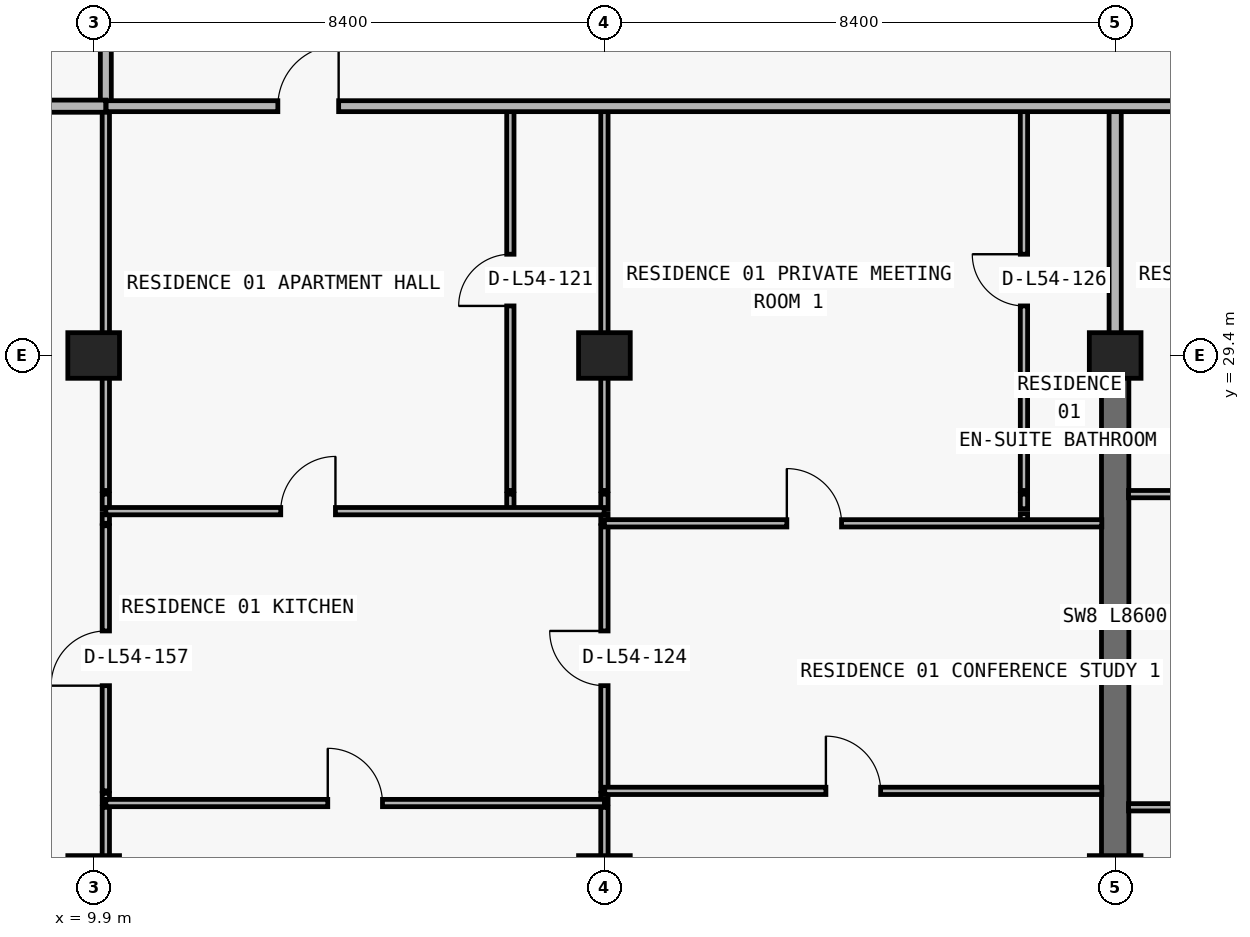
"""IFC4 building model, lengths in metres.
Left out: names, types, materials, properties, quantities, classifications, styles, units other than length and angle.
Written with IfcOpenShell. Run it as: python <this file> out.ifc"""

import sys

from ifc_helpers import new_model, si_unit, direction, frame, frame_2d, origin, origin_2d, place, context, subcontext, project, spatial, rectangle, extrude, element, fill, save


model = new_model("IFC4")
c1 = context("Model", 3, precision=1e-05, world=origin(), true_north=direction((0.0, 1.0)))
c2 = subcontext(c1, "Body", "Model", "MODEL_VIEW")
j1 = project(units=[si_unit("LENGTHUNIT", "METRE"), si_unit("PLANEANGLEUNIT", "RADIAN")], contexts=[c1])
p1 = place(None, origin())
s1 = spatial("IfcSite", under=j1, at=p1, CompositionType="ELEMENT")
p2 = place(p1, origin())
s2 = spatial("IfcBuilding", under=s1, at=p2, CompositionType="ELEMENT")
p3 = place(p2, frame((0.0, 0.0, 195.0)))
s3 = spatial("IfcBuildingStorey", under=s2, at=p3, CompositionType="ELEMENT", Elevation=195.0)
for number, where, z_axis, x_axis in (
    (1, (9.9, 20.8, 0.0), (0.0, 0.0, 1.0), (1.0, 0.0, 0.0)),
    (2, (18.3, 20.8, 0.0), (0.0, 0.0, 1.0), (1.0, 0.0, 0.0)),
    (3, (26.7, 20.8, 0.0), (0.0, 0.0, 1.0), (1.0, 0.0, 0.0)),
    (4, (9.9, 29.4, 0.0), (0.0, 0.0, 1.0), (1.0, 0.0, 0.0)),
    (5, (18.3, 29.4, 0.0), (0.0, 0.0, 1.0), (1.0, 0.0, 0.0)),
    (6, (26.7, 29.4, 0.0), (0.0, 0.0, 1.0), (1.0, 0.0, 0.0)),
):
    element("IfcColumn", number, at=place(p3, frame(where, z_axis=z_axis, x_axis=x_axis)), inside=s3, PredefinedType="COLUMN", context=c2, shape_type="SweptSolid", body=[
        extrude(rectangle(XDim=0.85, YDim=0.75, at=origin_2d()), origin(), (0.0, 0.0, 1.0), 3.05),
    ])
p4 = place(p3, frame((26.7, 20.8, 0.0), z_axis=(0.0, 0.0, 1.0), x_axis=(0.0, 1.0, 0.0)))
e7 = element("IfcWall", 7, at=p4, inside=s3, PredefinedType="SHEAR", context=c2, shape_type="SweptSolid", body=[
    extrude(rectangle(XDim=8.6, YDim=0.45, at=frame_2d((4.3, 0.0))), origin(), (0.0, 0.0, 1.0), 3.05),
])
p5 = place(p3, frame((10.1, 11.285, 0.0), z_axis=(0.0, 0.0, 1.0), x_axis=(0.0, 1.0, 0.0)))
e8 = element("IfcWall", 8, at=p5, inside=s3, PredefinedType="PARTITIONING", context=c2, shape_type="SweptSolid", body=[
    extrude(rectangle(XDim=10.685, YDim=0.12, at=frame_2d((5.343, 0.0))), origin(), (0.0, 0.0, 1.0), 2.263),
])
p6 = place(p3, frame((10.1, 22.04, 0.0), z_axis=(0.0, 0.0, 1.0), x_axis=(0.0, 1.0, 0.0)))
e9 = element("IfcWall", 9, at=p6, inside=s3, PredefinedType="PARTITIONING", context=c2, shape_type="SweptSolid", body=[
    extrude(rectangle(XDim=0.16, YDim=0.12, at=frame_2d((0.08, 0.0))), origin(), (0.0, 0.0, 1.0), 2.263),
])
p7 = place(p3, frame((10.1, 22.24, 0.0), z_axis=(0.0, 0.0, 1.0), x_axis=(0.0, 1.0, 0.0)))
e10 = element("IfcWall", 10, at=p7, inside=s3, PredefinedType="PARTITIONING", context=c2, shape_type="SweptSolid", body=[
    extrude(rectangle(XDim=4.36, YDim=0.12, at=frame_2d((2.18, 0.0))), origin(), (0.0, 0.0, 1.0), 2.263),
])
p8 = place(p7, frame((1.73, 0.0, 0.0)))
e11 = element("IfcOpeningElement", 11, at=p8, cuts=e10, PredefinedType="OPENING", context=c2, shape_type="SweptSolid", body=[
    extrude(rectangle(XDim=0.9, YDim=2.15, at=frame_2d((0.45, 1.075))), frame((0.0, 0.07, 0.0), z_axis=(0.0, -1.0, 0.0), x_axis=(1.0, 0.0, 0.0)), (0.0, 0.0, 1.0), 0.14),
])
p9 = place(p3, frame((10.1, 26.64, 0.0), z_axis=(0.0, 0.0, 1.0), x_axis=(0.0, 1.0, 0.0)))
e12 = element("IfcWall", 12, at=p9, inside=s3, PredefinedType="PARTITIONING", context=c2, shape_type="SweptSolid", body=[
    extrude(rectangle(XDim=0.16, YDim=0.12, at=frame_2d((0.08, 0.0))), origin(), (0.0, 0.0, 1.0), 2.263),
])
p10 = place(p3, frame((10.1, 26.88, 0.0), z_axis=(0.0, 0.0, 1.0), x_axis=(0.0, 1.0, 0.0)))
e13 = element("IfcWall", 13, at=p10, inside=s3, PredefinedType="PARTITIONING", context=c2, shape_type="SweptSolid", body=[
    extrude(rectangle(XDim=0.24, YDim=0.12, at=frame_2d((0.12, 0.0))), origin(), (0.0, 0.0, 1.0), 2.263),
])
p11 = place(p3, frame((10.1, 27.18, 0.0), z_axis=(0.0, 0.0, 1.0), x_axis=(0.0, 1.0, 0.0)))
e14 = element("IfcWall", 14, at=p11, inside=s3, PredefinedType="PARTITIONING", context=c2, shape_type="SweptSolid", body=[
    extrude(rectangle(XDim=6.32, YDim=0.12, at=frame_2d((3.16, 0.0))), origin(), (0.0, 0.0, 1.0), 2.263),
])
p12 = place(p3, frame((10.1, 33.505, 0.0), z_axis=(0.0, 0.0, 1.0), x_axis=(0.0, 1.0, 0.0)))
e15 = element("IfcWall", 15, at=p12, inside=s3, PredefinedType="PARTITIONING", context=c2, shape_type="SweptSolid", body=[
    extrude(rectangle(XDim=3.495, YDim=0.18, at=frame_2d((1.748, 0.0))), origin(), (0.0, 0.0, 1.0), 2.263),
])
p13 = place(p3, frame((16.753, 26.88, 0.0), z_axis=(0.0, 0.0, 1.0), x_axis=(0.0, 1.0, 0.0)))
e16 = element("IfcWall", 16, at=p13, inside=s3, PredefinedType="PARTITIONING", context=c2, shape_type="SweptSolid", body=[
    extrude(rectangle(XDim=0.24, YDim=0.12, at=frame_2d((0.12, 0.0))), origin(), (0.0, 0.0, 1.0), 3.05),
])
p14 = place(p3, frame((16.753, 27.18, 0.0), z_axis=(0.0, 0.0, 1.0), x_axis=(0.0, 1.0, 0.0)))
e17 = element("IfcWall", 17, at=p14, inside=s3, PredefinedType="PARTITIONING", context=c2, shape_type="SweptSolid", body=[
    extrude(rectangle(XDim=6.32, YDim=0.12, at=frame_2d((3.16, 0.0))), origin(), (0.0, 0.0, 1.0), 3.05),
])
p15 = place(p14, frame((3.035, 0.0, 0.0)))
e18 = element("IfcOpeningElement", 18, at=p15, cuts=e17, PredefinedType="OPENING", context=c2, shape_type="SweptSolid", body=[
    extrude(rectangle(XDim=0.85, YDim=2.1, at=frame_2d((0.425, 1.05))), frame((0.0, 0.07, 0.0), z_axis=(0.0, -1.0, 0.0), x_axis=(1.0, 0.0, 0.0)), (0.0, 0.0, 1.0), 0.14),
])
p16 = place(p3, frame((18.3, 11.24, 0.0), z_axis=(0.0, 0.0, 1.0), x_axis=(0.0, 1.0, 0.0)))
e19 = element("IfcWall", 19, at=p16, inside=s3, PredefinedType="PARTITIONING", context=c2, shape_type="SweptSolid", body=[
    extrude(rectangle(XDim=10.73, YDim=0.12, at=frame_2d((5.365, 0.0))), origin(), (0.0, 0.0, 1.0), 2.263),
])
p17 = place(p3, frame((18.3, 22.04, 0.0), z_axis=(0.0, 0.0, 1.0), x_axis=(0.0, 1.0, 0.0)))
e20 = element("IfcWall", 20, at=p17, inside=s3, PredefinedType="PARTITIONING", context=c2, shape_type="SweptSolid", body=[
    extrude(rectangle(XDim=0.16, YDim=0.12, at=frame_2d((0.08, 0.0))), origin(), (0.0, 0.0, 1.0), 2.263),
])
p18 = place(p3, frame((18.3, 22.24, 0.0), z_axis=(0.0, 0.0, 1.0), x_axis=(0.0, 1.0, 0.0)))
e21 = element("IfcWall", 21, at=p18, inside=s3, PredefinedType="PARTITIONING", context=c2, shape_type="SweptSolid", body=[
    extrude(rectangle(XDim=4.36, YDim=0.12, at=frame_2d((2.18, 0.0))), origin(), (0.0, 0.0, 1.0), 2.263),
])
p19 = place(p18, frame((1.73, 0.0, 0.0)))
e22 = element("IfcOpeningElement", 22, at=p19, cuts=e21, PredefinedType="OPENING", context=c2, shape_type="SweptSolid", body=[
    extrude(rectangle(XDim=0.9, YDim=2.15, at=frame_2d((0.45, 1.075))), frame((0.0, 0.07, 0.0), z_axis=(0.0, -1.0, 0.0), x_axis=(1.0, 0.0, 0.0)), (0.0, 0.0, 1.0), 0.14),
])
p20 = place(p3, frame((18.3, 26.64, 0.0), z_axis=(0.0, 0.0, 1.0), x_axis=(0.0, 1.0, 0.0)))
e23 = element("IfcWall", 23, at=p20, inside=s3, PredefinedType="PARTITIONING", context=c2, shape_type="SweptSolid", body=[
    extrude(rectangle(XDim=0.16, YDim=0.12, at=frame_2d((0.08, 0.0))), origin(), (0.0, 0.0, 1.0), 2.263),
])
p21 = place(p3, frame((18.3, 26.88, 0.0), z_axis=(0.0, 0.0, 1.0), x_axis=(0.0, 1.0, 0.0)))
e24 = element("IfcWall", 24, at=p21, inside=s3, PredefinedType="PARTITIONING", context=c2, shape_type="SweptSolid", body=[
    extrude(rectangle(XDim=0.24, YDim=0.12, at=frame_2d((0.12, 0.0))), origin(), (0.0, 0.0, 1.0), 2.263),
])
p22 = place(p3, frame((18.3, 27.18, 0.0), z_axis=(0.0, 0.0, 1.0), x_axis=(0.0, 1.0, 0.0)))
e25 = element("IfcWall", 25, at=p22, inside=s3, PredefinedType="PARTITIONING", context=c2, shape_type="SweptSolid", body=[
    extrude(rectangle(XDim=6.32, YDim=0.12, at=frame_2d((3.16, 0.0))), origin(), (0.0, 0.0, 1.0), 2.263),
])
p23 = place(p3, frame((25.2, 26.64, 0.0), z_axis=(0.0, 0.0, 1.0), x_axis=(0.0, 1.0, 0.0)))
e26 = element("IfcWall", 26, at=p23, inside=s3, PredefinedType="PARTITIONING", context=c2, shape_type="SweptSolid", body=[
    extrude(rectangle(XDim=0.16, YDim=0.12, at=frame_2d((0.08, 0.0))), origin(), (0.0, 0.0, 1.0), 3.05),
])
p24 = place(p3, frame((25.2, 26.88, 0.0), z_axis=(0.0, 0.0, 1.0), x_axis=(0.0, 1.0, 0.0)))
e27 = element("IfcWall", 27, at=p24, inside=s3, PredefinedType="PARTITIONING", context=c2, shape_type="SweptSolid", body=[
    extrude(rectangle(XDim=0.24, YDim=0.12, at=frame_2d((0.12, 0.0))), origin(), (0.0, 0.0, 1.0), 3.05),
])
p25 = place(p3, frame((25.2, 27.18, 0.0), z_axis=(0.0, 0.0, 1.0), x_axis=(0.0, 1.0, 0.0)))
e28 = element("IfcWall", 28, at=p25, inside=s3, PredefinedType="PARTITIONING", context=c2, shape_type="SweptSolid", body=[
    extrude(rectangle(XDim=6.32, YDim=0.12, at=frame_2d((3.16, 0.0))), origin(), (0.0, 0.0, 1.0), 3.05),
])
p26 = place(p25, frame((3.035, 0.0, 0.0)))
e29 = element("IfcOpeningElement", 29, at=p26, cuts=e28, PredefinedType="OPENING", context=c2, shape_type="SweptSolid", body=[
    extrude(rectangle(XDim=0.85, YDim=2.1, at=frame_2d((0.425, 1.05))), frame((0.0, 0.07, 0.0), z_axis=(0.0, -1.0, 0.0), x_axis=(1.0, 0.0, 0.0)), (0.0, 0.0, 1.0), 0.14),
])
p27 = place(p3, frame((26.7, 29.405, 0.0), z_axis=(0.0, 0.0, 1.0), x_axis=(0.0, 1.0, 0.0)))
e30 = element("IfcWall", 30, at=p27, inside=s3, PredefinedType="PARTITIONING", context=c2, shape_type="SweptSolid", body=[
    extrude(rectangle(XDim=4.095, YDim=0.2, at=frame_2d((2.047, 0.0))), origin(), (0.0, 0.0, 1.0), 2.335),
])
p28 = place(p3, frame((26.92, 21.97, 0.0), z_axis=(0.0, 0.0, 1.0), x_axis=(1.0, 0.0, 0.0)))
e31 = element("IfcWall", 31, at=p28, inside=s3, PredefinedType="PARTITIONING", context=c2, shape_type="SweptSolid", body=[
    extrude(rectangle(XDim=8.18, YDim=0.12, at=frame_2d((4.09, 0.0))), origin(), (0.0, 0.0, 1.0), 3.05),
])
p29 = place(p28, frame((1.75, 0.0, 0.0)))
e32 = element("IfcOpeningElement", 32, at=p29, cuts=e31, PredefinedType="OPENING", context=c2, shape_type="SweptSolid", body=[
    extrude(rectangle(XDim=0.9, YDim=2.15, at=frame_2d((0.45, 1.075))), frame((0.0, 0.07, 0.0), z_axis=(0.0, -1.0, 0.0), x_axis=(1.0, 0.0, 0.0)), (0.0, 0.0, 1.0), 0.14),
])
p30 = place(p28, frame((5.923, 0.0, 0.0)))
e33 = element("IfcOpeningElement", 33, at=p30, cuts=e31, PredefinedType="OPENING", context=c2, shape_type="SweptSolid", body=[
    extrude(rectangle(XDim=0.9, YDim=2.15, at=frame_2d((0.45, 1.075))), frame((0.0, 0.07, 0.0), z_axis=(0.0, -1.0, 0.0), x_axis=(1.0, 0.0, 0.0)), (0.0, 0.0, 1.0), 0.14),
])
p31 = place(p3, frame((10.1, 22.04, 0.0), z_axis=(0.0, 0.0, 1.0), x_axis=(1.0, 0.0, 0.0)))
e34 = element("IfcWall", 34, at=p31, inside=s3, PredefinedType="PARTITIONING", context=c2, shape_type="SweptSolid", body=[
    extrude(rectangle(XDim=8.2, YDim=0.12, at=frame_2d((4.1, 0.0))), origin(), (0.0, 0.0, 1.0), 3.05),
])
p32 = place(p31, frame((3.65, 0.0, 0.0)))
e35 = element("IfcOpeningElement", 35, at=p32, cuts=e34, PredefinedType="OPENING", context=c2, shape_type="SweptSolid", body=[
    extrude(rectangle(XDim=0.9, YDim=2.15, at=frame_2d((0.45, 1.075))), frame((0.0, 0.07, 0.0), z_axis=(0.0, -1.0, 0.0), x_axis=(1.0, 0.0, 0.0)), (0.0, 0.0, 1.0), 0.14),
])
p33 = place(p3, frame((18.305, 22.24, 0.0), z_axis=(0.0, 0.0, 1.0), x_axis=(1.0, 0.0, 0.0)))
e36 = element("IfcWall", 36, at=p33, inside=s3, PredefinedType="PARTITIONING", context=c2, shape_type="SweptSolid", body=[
    extrude(rectangle(XDim=8.175, YDim=0.12, at=frame_2d((4.087, 0.0))), origin(), (0.0, 0.0, 1.0), 3.05),
])
p34 = place(p33, frame((3.637, 0.0, 0.0)))
e37 = element("IfcOpeningElement", 37, at=p34, cuts=e36, PredefinedType="OPENING", context=c2, shape_type="SweptSolid", body=[
    extrude(rectangle(XDim=0.9, YDim=2.15, at=frame_2d((0.45, 1.075))), frame((0.0, 0.07, 0.0), z_axis=(0.0, -1.0, 0.0), x_axis=(1.0, 0.0, 0.0)), (0.0, 0.0, 1.0), 0.14),
])
p35 = place(p3, frame((18.3, 26.64, 0.0), z_axis=(0.0, 0.0, 1.0), x_axis=(1.0, 0.0, 0.0)))
e38 = element("IfcWall", 38, at=p35, inside=s3, PredefinedType="PARTITIONING", context=c2, shape_type="SweptSolid", body=[
    extrude(rectangle(XDim=8.18, YDim=0.12, at=frame_2d((4.09, 0.0))), origin(), (0.0, 0.0, 1.0), 3.05),
])
p36 = place(p35, frame((3.0, 0.0, 0.0)))
e39 = element("IfcOpeningElement", 39, at=p36, cuts=e38, PredefinedType="OPENING", context=c2, shape_type="SweptSolid", body=[
    extrude(rectangle(XDim=0.9, YDim=2.15, at=frame_2d((0.45, 1.075))), frame((0.0, 0.07, 0.0), z_axis=(0.0, -1.0, 0.0), x_axis=(1.0, 0.0, 0.0)), (0.0, 0.0, 1.0), 0.14),
])
p37 = place(p3, frame((10.1, 26.84, 0.0), z_axis=(0.0, 0.0, 1.0), x_axis=(1.0, 0.0, 0.0)))
e40 = element("IfcWall", 40, at=p37, inside=s3, PredefinedType="PARTITIONING", context=c2, shape_type="SweptSolid", body=[
    extrude(rectangle(XDim=8.195, YDim=0.12, at=frame_2d((4.097, 0.0))), origin(), (0.0, 0.0, 1.0), 3.05),
])
p38 = place(p37, frame((2.876, 0.0, 0.0)))
e41 = element("IfcOpeningElement", 41, at=p38, cuts=e40, PredefinedType="OPENING", context=c2, shape_type="SweptSolid", body=[
    extrude(rectangle(XDim=0.9, YDim=2.15, at=frame_2d((0.45, 1.075))), frame((0.0, 0.07, 0.0), z_axis=(0.0, -1.0, 0.0), x_axis=(1.0, 0.0, 0.0)), (0.0, 0.0, 1.0), 0.14),
])
p39 = place(p3, frame((26.92, 27.12, 0.0), z_axis=(0.0, 0.0, 1.0), x_axis=(1.0, 0.0, 0.0)))
e42 = element("IfcWall", 42, at=p39, inside=s3, PredefinedType="PARTITIONING", context=c2, shape_type="SweptSolid", body=[
    extrude(rectangle(XDim=8.18, YDim=0.12, at=frame_2d((4.09, 0.0))), origin(), (0.0, 0.0, 1.0), 3.05),
])
p40 = place(p39, frame((1.833, 0.0, 0.0)))
e43 = element("IfcOpeningElement", 43, at=p40, cuts=e42, PredefinedType="OPENING", context=c2, shape_type="SweptSolid", body=[
    extrude(rectangle(XDim=0.9, YDim=2.15, at=frame_2d((0.45, 1.075))), frame((0.0, 0.07, 0.0), z_axis=(0.0, -1.0, 0.0), x_axis=(1.0, 0.0, 0.0)), (0.0, 0.0, 1.0), 0.14),
])
p41 = place(p3, frame((6.395, 33.5, 0.0), z_axis=(0.0, 0.0, 1.0), x_axis=(1.0, 0.0, 0.0)))
e44 = element("IfcWall", 44, at=p41, inside=s3, PredefinedType="PARTITIONING", context=c2, shape_type="SweptSolid", body=[
    extrude(rectangle(XDim=3.705, YDim=0.2, at=frame_2d((1.853, 0.0))), origin(), (0.0, 0.0, 1.0), 3.05),
])
p42 = place(p3, frame((10.105, 33.5, 0.0), z_axis=(0.0, 0.0, 1.0), x_axis=(1.0, 0.0, 0.0)))
e45 = element("IfcWall", 45, at=p42, inside=s3, PredefinedType="PARTITIONING", context=c2, shape_type="SweptSolid", body=[
    extrude(rectangle(XDim=57.595, YDim=0.18, at=frame_2d((28.797, 0.0))), origin(), (0.0, 0.0, 1.0), 3.05),
])
p43 = place(p42, frame((2.824, 0.0, 0.0)))
e46 = element("IfcOpeningElement", 46, at=p43, cuts=e45, PredefinedType="OPENING", context=c2, shape_type="SweptSolid", body=[
    extrude(rectangle(XDim=1.0, YDim=2.2, at=frame_2d((0.5, 1.1))), frame((0.0, 0.1, 0.0), z_axis=(0.0, -1.0, 0.0), x_axis=(1.0, 0.0, 0.0)), (0.0, 0.0, 1.0), 0.2),
])
p44 = place(p42, frame((19.47, 0.0, 0.0)))
e47 = element("IfcOpeningElement", 47, at=p44, cuts=e45, PredefinedType="OPENING", context=c2, shape_type="SweptSolid", body=[
    extrude(rectangle(XDim=1.0, YDim=2.2, at=frame_2d((0.5, 1.1))), frame((0.0, 0.1, 0.0), z_axis=(0.0, -1.0, 0.0), x_axis=(1.0, 0.0, 0.0)), (0.0, 0.0, 1.0), 0.2),
])
p45 = place(p42, frame((27.527, 0.0, 0.0)))
e48 = element("IfcOpeningElement", 48, at=p45, cuts=e45, PredefinedType="OPENING", context=c2, shape_type="SweptSolid", body=[
    extrude(rectangle(XDim=1.0, YDim=2.2, at=frame_2d((0.5, 1.1))), frame((0.0, 0.1, 0.0), z_axis=(0.0, -1.0, 0.0), x_axis=(1.0, 0.0, 0.0)), (0.0, 0.0, 1.0), 0.2),
])
p46 = place(p42, frame((43.87, 0.0, 0.0)))
e49 = element("IfcOpeningElement", 49, at=p46, cuts=e45, PredefinedType="OPENING", context=c2, shape_type="SweptSolid", body=[
    extrude(rectangle(XDim=1.0, YDim=2.2, at=frame_2d((0.5, 1.1))), frame((0.0, 0.1, 0.0), z_axis=(0.0, -1.0, 0.0), x_axis=(1.0, 0.0, 0.0)), (0.0, 0.0, 1.0), 0.2),
])
p47 = place(p42, frame((52.17, 0.0, 0.0)))
e50 = element("IfcOpeningElement", 50, at=p47, cuts=e45, PredefinedType="OPENING", context=c2, shape_type="SweptSolid", body=[
    extrude(rectangle(XDim=1.0, YDim=2.2, at=frame_2d((0.5, 1.1))), frame((0.0, 0.1, 0.0), z_axis=(0.0, -1.0, 0.0), x_axis=(1.0, 0.0, 0.0)), (0.0, 0.0, 1.0), 0.2),
])
p48 = place(p43, origin())
e51 = element("IfcDoor", 51, at=p48, inside=s3, OperationType="SINGLE_SWING_RIGHT", PredefinedType="DOOR", context=c2, shape_type="SweptSolid", body=[
    extrude(rectangle(XDim=1.0, YDim=2.2, at=frame_2d((0.5, 1.1))), frame((0.0, 0.025, 0.0), z_axis=(0.0, -1.0, 0.0), x_axis=(1.0, 0.0, 0.0)), (0.0, 0.0, 1.0), 0.05),
])
fill(e46, e51)
p49 = place(p15, origin())
e52 = element("IfcDoor", 52, at=p49, inside=s3, OperationType="SINGLE_SWING_LEFT", PredefinedType="DOOR", context=c2, shape_type="SweptSolid", body=[
    extrude(rectangle(XDim=0.85, YDim=2.1, at=frame_2d((0.425, 1.05))), frame((0.0, 0.025, 0.0), z_axis=(0.0, -1.0, 0.0), x_axis=(1.0, 0.0, 0.0)), (0.0, 0.0, 1.0), 0.05),
])
fill(e18, e52)
p50 = place(p38, origin())
e53 = element("IfcDoor", 53, at=p50, inside=s3, OperationType="SINGLE_SWING_RIGHT", PredefinedType="DOOR", context=c2, shape_type="SweptSolid", body=[
    extrude(rectangle(XDim=0.9, YDim=2.15, at=frame_2d((0.45, 1.075))), frame((0.0, 0.025, 0.0), z_axis=(0.0, -1.0, 0.0), x_axis=(1.0, 0.0, 0.0)), (0.0, 0.0, 1.0), 0.05),
])
fill(e41, e53)
p51 = place(p32, origin())
e54 = element("IfcDoor", 54, at=p51, inside=s3, OperationType="SINGLE_SWING_LEFT", PredefinedType="DOOR", context=c2, shape_type="SweptSolid", body=[
    extrude(rectangle(XDim=0.9, YDim=2.15, at=frame_2d((0.45, 1.075))), frame((0.0, 0.025, 0.0), z_axis=(0.0, -1.0, 0.0), x_axis=(1.0, 0.0, 0.0)), (0.0, 0.0, 1.0), 0.05),
])
fill(e35, e54)
p52 = place(p19, origin())
e55 = element("IfcDoor", 55, at=p52, inside=s3, OperationType="SINGLE_SWING_RIGHT", PredefinedType="DOOR", context=c2, shape_type="SweptSolid", body=[
    extrude(rectangle(XDim=0.9, YDim=2.15, at=frame_2d((0.45, 1.075))), frame((0.0, 0.025, 0.0), z_axis=(0.0, -1.0, 0.0), x_axis=(1.0, 0.0, 0.0)), (0.0, 0.0, 1.0), 0.05),
])
fill(e22, e55)
p53 = place(p36, origin())
e56 = element("IfcDoor", 56, at=p53, inside=s3, OperationType="SINGLE_SWING_LEFT", PredefinedType="DOOR", context=c2, shape_type="SweptSolid", body=[
    extrude(rectangle(XDim=0.9, YDim=2.15, at=frame_2d((0.45, 1.075))), frame((0.0, 0.025, 0.0), z_axis=(0.0, -1.0, 0.0), x_axis=(1.0, 0.0, 0.0)), (0.0, 0.0, 1.0), 0.05),
])
fill(e39, e56)
p54 = place(p26, origin())
e57 = element("IfcDoor", 57, at=p54, inside=s3, OperationType="SINGLE_SWING_RIGHT", PredefinedType="DOOR", context=c2, shape_type="SweptSolid", body=[
    extrude(rectangle(XDim=0.85, YDim=2.1, at=frame_2d((0.425, 1.05))), frame((0.0, 0.025, 0.0), z_axis=(0.0, -1.0, 0.0), x_axis=(1.0, 0.0, 0.0)), (0.0, 0.0, 1.0), 0.05),
])
fill(e29, e57)
p55 = place(p34, origin())
e58 = element("IfcDoor", 58, at=p55, inside=s3, OperationType="SINGLE_SWING_LEFT", PredefinedType="DOOR", context=c2, shape_type="SweptSolid", body=[
    extrude(rectangle(XDim=0.9, YDim=2.15, at=frame_2d((0.45, 1.075))), frame((0.0, 0.025, 0.0), z_axis=(0.0, -1.0, 0.0), x_axis=(1.0, 0.0, 0.0)), (0.0, 0.0, 1.0), 0.05),
])
fill(e37, e58)
p56 = place(p8, origin())
e59 = element("IfcDoor", 59, at=p56, inside=s3, OperationType="SINGLE_SWING_LEFT", PredefinedType="DOOR", context=c2, shape_type="SweptSolid", body=[
    extrude(rectangle(XDim=0.9, YDim=2.15, at=frame_2d((0.45, 1.075))), frame((0.0, 0.025, 0.0), z_axis=(0.0, -1.0, 0.0), x_axis=(1.0, 0.0, 0.0)), (0.0, 0.0, 1.0), 0.05),
])
fill(e11, e59)
save(model, sys.argv[1])
